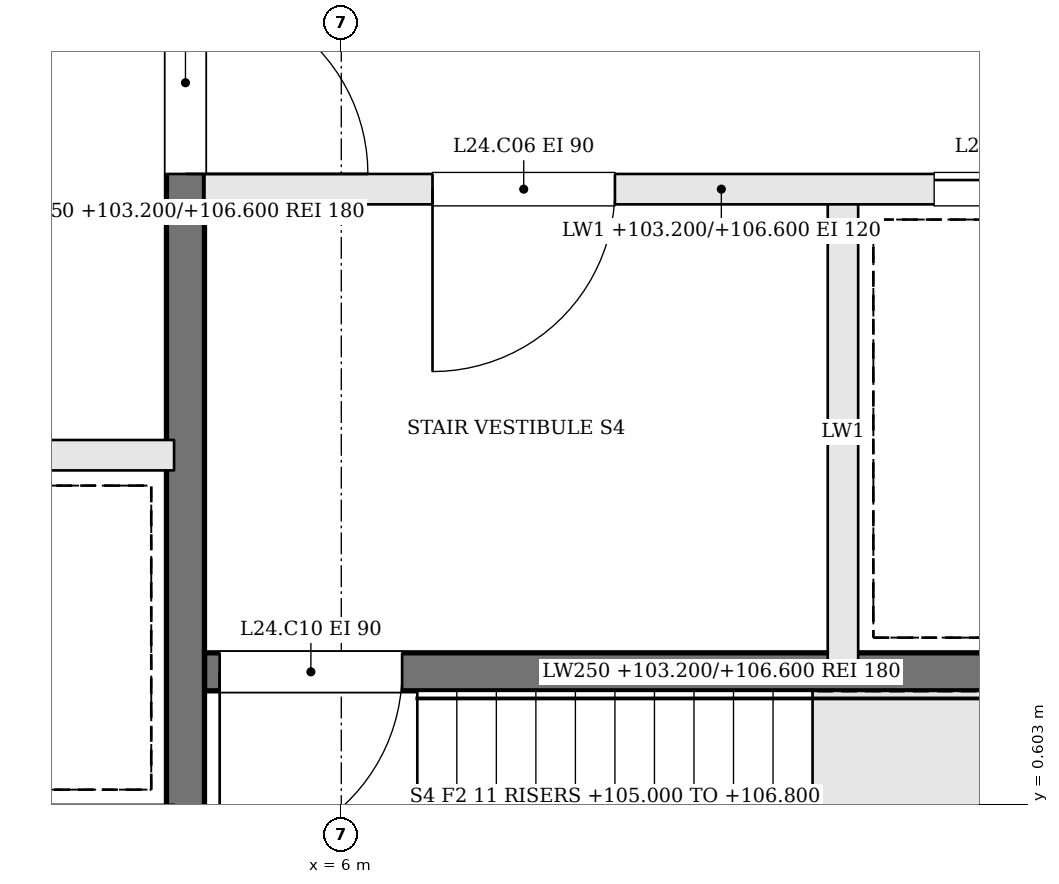
"""IFC4 building model, lengths in metres.
Left out: names, types, materials, properties, quantities, classifications, styles, units other than length and angle.
Written with IfcOpenShell. Run it as: python <this file> out.ifc"""

import sys

from ifc_helpers import new_model, si_unit, direction, frame, frame_2d, origin, place, context, subcontext, project, spatial, rectangle, extrude, element, fill, save


model = new_model("IFC4")
c1 = context("Model", 3, precision=1e-05, world=origin(), true_north=direction((0.0, 1.0)))
c2 = subcontext(c1, "Body", "Model", "MODEL_VIEW")
j1 = project(units=[si_unit("LENGTHUNIT", "METRE"), si_unit("PLANEANGLEUNIT", "RADIAN")], contexts=[c1])
p1 = place(None, origin())
s1 = spatial("IfcSite", under=j1, at=p1, CompositionType="ELEMENT")
p2 = place(p1, origin())
s2 = spatial("IfcBuilding", under=s1, at=p2, CompositionType="ELEMENT")
p3 = place(p2, frame((0.0, 0.0, 103.2)))
s3 = spatial("IfcBuildingStorey", under=s2, at=p3, CompositionType="ELEMENT", Elevation=103.2)
p4 = place(p3, frame((11.9, 4.65, 0.0), z_axis=(0.0, 0.0, 1.0), x_axis=(-1.0, 0.0, 0.0)))
e1 = element("IfcWall", 1, at=p4, inside=s3, PredefinedType="SOLIDWALL", context=c2, shape_type="SweptSolid", body=[
    extrude(rectangle(XDim=6.8, YDim=0.2, at=frame_2d((3.4, 0.0))), origin(), (0.0, 0.0, 1.0), 3.4),
])
p5 = place(p4, frame((4.1, 0.0, 0.0)))
e2 = element("IfcOpeningElement", 2, at=p5, cuts=e1, PredefinedType="OPENING", context=c2, shape_type="SweptSolid", body=[
    extrude(rectangle(XDim=1.2, YDim=2.1, at=frame_2d((0.6, 1.05))), frame((0.0, 0.11, 0.0), z_axis=(0.0, -1.0, 0.0), x_axis=(1.0, 0.0, 0.0)), (0.0, 0.0, 1.0), 0.22),
])
p6 = place(p4, frame((0.8, 0.0, 0.0)))
e3 = element("IfcOpeningElement", 3, at=p6, cuts=e1, PredefinedType="OPENING", context=c2, shape_type="SweptSolid", body=[
    extrude(rectangle(XDim=1.2, YDim=2.1, at=frame_2d((0.6, 1.05))), frame((0.0, 0.11, 0.0), z_axis=(0.0, -1.0, 0.0), x_axis=(1.0, 0.0, 0.0)), (0.0, 0.0, 1.0), 0.22),
])
p7 = place(p3, frame((11.9, 1.475, 0.0), z_axis=(0.0, 0.0, 1.0), x_axis=(-1.0, 0.0, 0.0)))
e4 = element("IfcWall", 4, at=p7, inside=s3, PredefinedType="SOLIDWALL", context=c2, shape_type="SweptSolid", body=[
    extrude(rectangle(XDim=6.8, YDim=0.25, at=frame_2d((3.4, 0.0))), origin(), (0.0, 0.0, 1.0), 3.4),
])
p8 = place(p7, frame((5.5, 0.0, 0.0)))
e5 = element("IfcOpeningElement", 5, at=p8, cuts=e4, PredefinedType="OPENING", context=c2, shape_type="SweptSolid", body=[
    extrude(rectangle(XDim=1.2, YDim=2.1, at=frame_2d((0.6, 1.05))), frame((0.0, 0.135, 0.0), z_axis=(0.0, -1.0, 0.0), x_axis=(1.0, 0.0, 0.0)), (0.0, 0.0, 1.0), 0.27),
])
p9 = place(p3, frame((9.3, 4.55, 0.0), z_axis=(0.0, 0.0, 1.0), x_axis=(0.0, -1.0, 0.0)))
e6 = element("IfcWall", 6, at=p9, inside=s3, PredefinedType="SOLIDWALL", context=c2, shape_type="SweptSolid", body=[
    extrude(rectangle(XDim=3.0, YDim=0.2, at=frame_2d((1.5, 0.0))), origin(), (0.0, 0.0, 1.0), 3.4),
])
p10 = place(p3, frame((4.975, 10.9, 0.0), z_axis=(0.0, 0.0, 1.0), x_axis=(0.0, -1.0, 0.0)))
e7 = element("IfcWall", 7, at=p10, inside=s3, PredefinedType="SOLIDWALL", context=c2, shape_type="SweptSolid", body=[
    extrude(rectangle(XDim=12.8, YDim=0.25, at=frame_2d((6.4, 0.0))), origin(), (0.0, 0.0, 1.0), 3.4),
])
p11 = place(p10, frame((4.95, 0.0, 0.0)))
e8 = element("IfcOpeningElement", 8, at=p11, cuts=e7, PredefinedType="OPENING", context=c2, shape_type="SweptSolid", body=[
    extrude(rectangle(XDim=1.2, YDim=2.1, at=frame_2d((0.6, 1.05))), frame((0.0, 0.135, 0.0), z_axis=(0.0, -1.0, 0.0), x_axis=(1.0, 0.0, 0.0)), (0.0, 0.0, 1.0), 0.27),
])
p12 = place(p3, frame((-4.9, 2.9, 0.0), z_axis=(0.0, 0.0, 1.0), x_axis=(1.0, 0.0, 0.0)))
e9 = element("IfcWall", 9, at=p12, inside=s3, PredefinedType="SOLIDWALL", context=c2, shape_type="SweptSolid", body=[
    extrude(rectangle(XDim=9.8, YDim=0.2, at=frame_2d((4.9, 0.0))), origin(), (0.0, 0.0, 1.0), 3.4),
])
p13 = place(p12, frame((0.675, 0.0, 0.0)))
e10 = element("IfcOpeningElement", 10, at=p13, cuts=e9, PredefinedType="OPENING", context=c2, shape_type="SweptSolid", body=[
    extrude(rectangle(XDim=1.1, YDim=2.1, at=frame_2d((0.55, 1.05))), frame((0.0, 0.11, 0.0), z_axis=(0.0, -1.0, 0.0), x_axis=(1.0, 0.0, 0.0)), (0.0, 0.0, 1.0), 0.22),
])
p14 = place(p12, frame((3.125, 0.0, 0.0)))
e11 = element("IfcOpeningElement", 11, at=p14, cuts=e9, PredefinedType="OPENING", context=c2, shape_type="SweptSolid", body=[
    extrude(rectangle(XDim=1.1, YDim=2.1, at=frame_2d((0.55, 1.05))), frame((0.0, 0.11, 0.0), z_axis=(0.0, -1.0, 0.0), x_axis=(1.0, 0.0, 0.0)), (0.0, 0.0, 1.0), 0.22),
])
p15 = place(p11, origin())
e12 = element("IfcDoor", 12, at=p15, inside=s3, OperationType="SINGLE_SWING_RIGHT", PredefinedType="DOOR", context=c2, shape_type="SweptSolid", body=[
    extrude(rectangle(XDim=1.2, YDim=2.1, at=frame_2d((0.6, 1.05))), frame((0.0, 0.025, 0.0), z_axis=(0.0, -1.0, 0.0), x_axis=(1.0, 0.0, 0.0)), (0.0, 0.0, 1.0), 0.05),
])
fill(e8, e12)
p16 = place(p5, origin())
e13 = element("IfcDoor", 13, at=p16, inside=s3, OperationType="SINGLE_SWING_RIGHT", PredefinedType="DOOR", context=c2, shape_type="SweptSolid", body=[
    extrude(rectangle(XDim=1.2, YDim=2.1, at=frame_2d((0.6, 1.05))), frame((0.0, 0.025, 0.0), z_axis=(0.0, -1.0, 0.0), x_axis=(1.0, 0.0, 0.0)), (0.0, 0.0, 1.0), 0.05),
])
fill(e2, e13)
p17 = place(p8, origin())
e14 = element("IfcDoor", 14, at=p17, inside=s3, OperationType="SINGLE_SWING_RIGHT", PredefinedType="DOOR", context=c2, shape_type="SweptSolid", body=[
    extrude(rectangle(XDim=1.2, YDim=2.1, at=frame_2d((0.6, 1.05))), frame((0.0, 0.025, 0.0), z_axis=(0.0, -1.0, 0.0), x_axis=(1.0, 0.0, 0.0)), (0.0, 0.0, 1.0), 0.05),
])
fill(e5, e14)
p18 = place(p6, origin())
e15 = element("IfcDoor", 15, at=p18, inside=s3, OperationType="SLIDING_TO_RIGHT", PredefinedType="DOOR", context=c2, shape_type="SweptSolid", body=[
    extrude(rectangle(XDim=1.2, YDim=2.1, at=frame_2d((0.6, 1.05))), frame((0.0, 0.025, 0.0), z_axis=(0.0, -1.0, 0.0), x_axis=(1.0, 0.0, 0.0)), (0.0, 0.0, 1.0), 0.05),
])
fill(e3, e15)
save(model, sys.argv[1])
